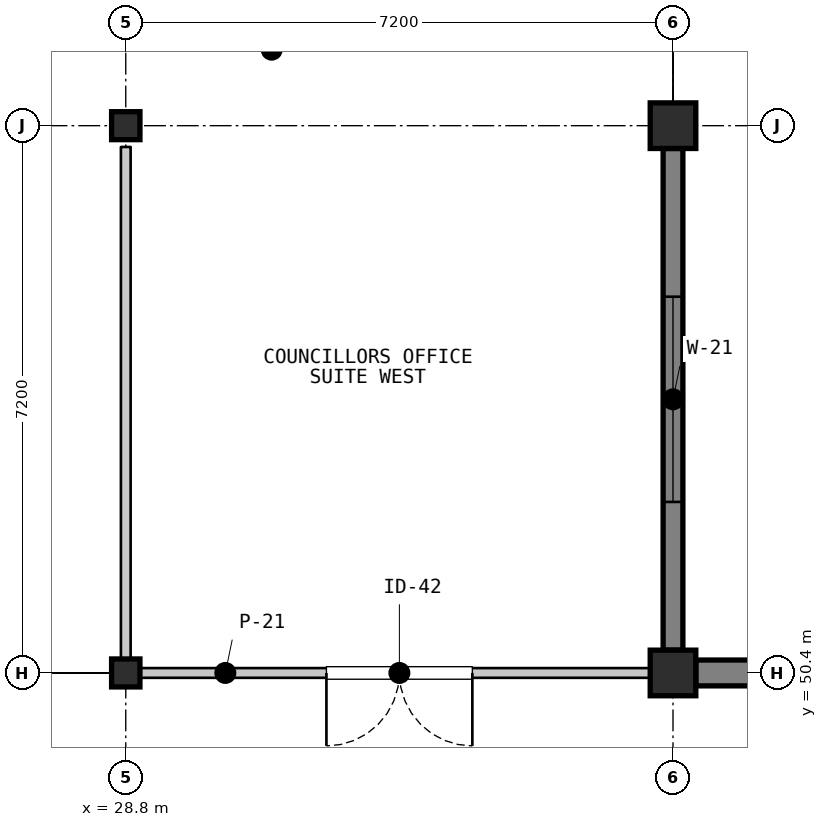
"""IFC4 building model, lengths in metres.
Left out: names, types, materials, properties, quantities, classifications, styles, units other than length and angle.
Written with IfcOpenShell. Run it as: python <this file> out.ifc"""

import sys

from ifc_helpers import new_model, si_unit, direction, frame, frame_2d, origin, origin_2d, place, context, subcontext, project, spatial, rectangle, i_section, extrude, element, fill, save


model = new_model("IFC4")
c1 = context("Model", 3, precision=1e-05, world=origin(), true_north=direction((0.0, 1.0)))
c2 = subcontext(c1, "Body", "Model", "MODEL_VIEW")
j1 = project(units=[si_unit("LENGTHUNIT", "METRE"), si_unit("PLANEANGLEUNIT", "RADIAN")], contexts=[c1])
p1 = place(None, origin())
s1 = spatial("IfcSite", under=j1, at=p1, CompositionType="ELEMENT")
p2 = place(p1, origin())
s2 = spatial("IfcBuilding", under=s1, at=p2, CompositionType="ELEMENT")
p3 = place(p2, frame((0.0, 0.0, 9.9)))
s3 = spatial("IfcBuildingStorey", under=s2, at=p3, CompositionType="ELEMENT", Elevation=9.9)
for number, where, z_axis, x_axis in (
    (1, (28.8, 50.4, 0.0), (0.0, 0.0, 1.0), (1.0, 0.0, 0.0)),
    (2, (28.8, 57.6, 0.0), (0.0, 0.0, 1.0), (1.0, 0.0, 0.0)),
):
    element("IfcColumn", number, at=place(p3, frame(where, z_axis=z_axis, x_axis=x_axis)), inside=s3, PredefinedType="COLUMN", context=c2, shape_type="SweptSolid", body=[
        extrude(i_section(OverallWidth=0.373, OverallDepth=0.368, WebThickness=0.015, FlangeThickness=0.024, FilletRadius=0.015, at=origin_2d()), origin(), (0.0, 0.0, 1.0), 4.2),
    ])
for number, where, z_axis, x_axis in (
    (3, (36.0, 50.4, 0.0), (0.0, 0.0, 1.0), (1.0, 0.0, 0.0)),
    (4, (36.0, 57.6, 0.0), (0.0, 0.0, 1.0), (1.0, 0.0, 0.0)),
):
    element("IfcColumn", number, at=place(p3, frame(where, z_axis=z_axis, x_axis=x_axis)), inside=s3, PredefinedType="COLUMN", context=c2, shape_type="SweptSolid", body=[
        extrude(rectangle(XDim=0.6, YDim=0.6, at=origin_2d()), origin(), (0.0, 0.0, 1.0), 4.2),
    ])
p4 = place(p3, frame((36.0, 57.3, 0.0), z_axis=(0.0, 0.0, 1.0), x_axis=(0.0, -1.0, 0.0)))
e5 = element("IfcWall", 5, at=p4, inside=s3, PredefinedType="SOLIDWALL", context=c2, shape_type="SweptSolid", body=[
    extrude(rectangle(XDim=6.6, YDim=0.26, at=frame_2d((3.3, 0.0))), origin(), (0.0, 0.0, 1.0), 3.487),
])
p5 = place(p4, frame((1.95, 0.0, 0.95)))
e6 = element("IfcOpeningElement", 6, at=p5, cuts=e5, PredefinedType="OPENING", context=c2, shape_type="SweptSolid", body=[
    extrude(rectangle(XDim=2.7, YDim=1.8, at=frame_2d((1.35, 0.9))), frame((0.0, 0.14, 0.0), z_axis=(0.0, -1.0, 0.0), x_axis=(1.0, 0.0, 0.0)), (0.0, 0.0, 1.0), 0.28),
])
p6 = place(p3, frame((36.3, 50.4, 0.0), z_axis=(0.0, 0.0, 1.0), x_axis=(1.0, 0.0, 0.0)))
e7 = element("IfcWall", 7, at=p6, inside=s3, PredefinedType="SOLIDWALL", context=c2, shape_type="SweptSolid", body=[
    extrude(rectangle(XDim=6.65, YDim=0.34, at=frame_2d((3.325, 0.0))), origin(), (0.0, 0.0, 1.0), 3.398),
])
p7 = place(p6, frame((0.996, 0.0, 0.95)))
e8 = element("IfcOpeningElement", 8, at=p7, cuts=e7, PredefinedType="OPENING", context=c2, shape_type="SweptSolid", body=[
    extrude(rectangle(XDim=1.2, YDim=1.7, at=frame_2d((0.6, 0.85))), frame((0.0, 0.18, 0.0), z_axis=(0.0, -1.0, 0.0), x_axis=(1.0, 0.0, 0.0)), (0.0, 0.0, 1.0), 0.36),
])
p8 = place(p6, frame((4.454, 0.0, 0.95)))
e9 = element("IfcOpeningElement", 9, at=p8, cuts=e7, PredefinedType="OPENING", context=c2, shape_type="SweptSolid", body=[
    extrude(rectangle(XDim=1.2, YDim=1.7, at=frame_2d((0.6, 0.85))), frame((0.0, 0.18, 0.0), z_axis=(0.0, -1.0, 0.0), x_axis=(1.0, 0.0, 0.0)), (0.0, 0.0, 1.0), 0.36),
])
p9 = place(p3, frame((35.88, 50.4, 0.0), z_axis=(0.0, 0.0, 1.0), x_axis=(-1.0, 0.0, 0.0)))
e10 = element("IfcWall", 10, at=p9, inside=s3, PredefinedType="PARTITIONING", context=c2, shape_type="SweptSolid", body=[
    extrude(rectangle(XDim=6.96, YDim=0.128, at=frame_2d((3.48, 0.0))), origin(), (0.0, 0.0, 1.0), 3.388),
])
p10 = place(p9, frame((2.52, 0.0, 0.0)))
e11 = element("IfcOpeningElement", 11, at=p10, cuts=e10, PredefinedType="OPENING", context=c2, shape_type="SweptSolid", body=[
    extrude(rectangle(XDim=1.92, YDim=2.38, at=frame_2d((0.96, 1.19))), frame((0.0, 0.074, 0.0), z_axis=(0.0, -1.0, 0.0), x_axis=(1.0, 0.0, 0.0)), (0.0, 0.0, 1.0), 0.148),
])
p11 = place(p3, frame((28.8, 50.52, 0.0), z_axis=(0.0, 0.0, 1.0), x_axis=(0.0, 1.0, 0.0)))
e12 = element("IfcWall", 12, at=p11, inside=s3, PredefinedType="PARTITIONING", context=c2, shape_type="SweptSolid", body=[
    extrude(rectangle(XDim=6.8, YDim=0.128, at=frame_2d((3.4, 0.0))), origin(), (0.0, 0.0, 1.0), 3.388),
])
p12 = place(p5, origin())
e13 = element("IfcWindow", 13, at=p12, inside=s3, PartitioningType="SINGLE_PANEL", PredefinedType="WINDOW", context=c2, shape_type="SweptSolid", body=[
    extrude(rectangle(XDim=2.7, YDim=1.8, at=frame_2d((1.35, 0.9))), frame((0.0, 0.03, 0.0), z_axis=(0.0, -1.0, 0.0), x_axis=(1.0, 0.0, 0.0)), (0.0, 0.0, 1.0), 0.06),
])
fill(e6, e13)
p13 = place(p10, origin())
e14 = element("IfcDoor", 14, at=p13, inside=s3, OperationType="DOUBLE_DOOR_SINGLE_SWING", PredefinedType="DOOR", context=c2, shape_type="SweptSolid", body=[
    extrude(rectangle(XDim=1.92, YDim=2.38, at=frame_2d((0.96, 1.19))), frame((0.0, 0.025, 0.0), z_axis=(0.0, -1.0, 0.0), x_axis=(1.0, 0.0, 0.0)), (0.0, 0.0, 1.0), 0.05),
])
fill(e11, e14)
save(model, sys.argv[1])
